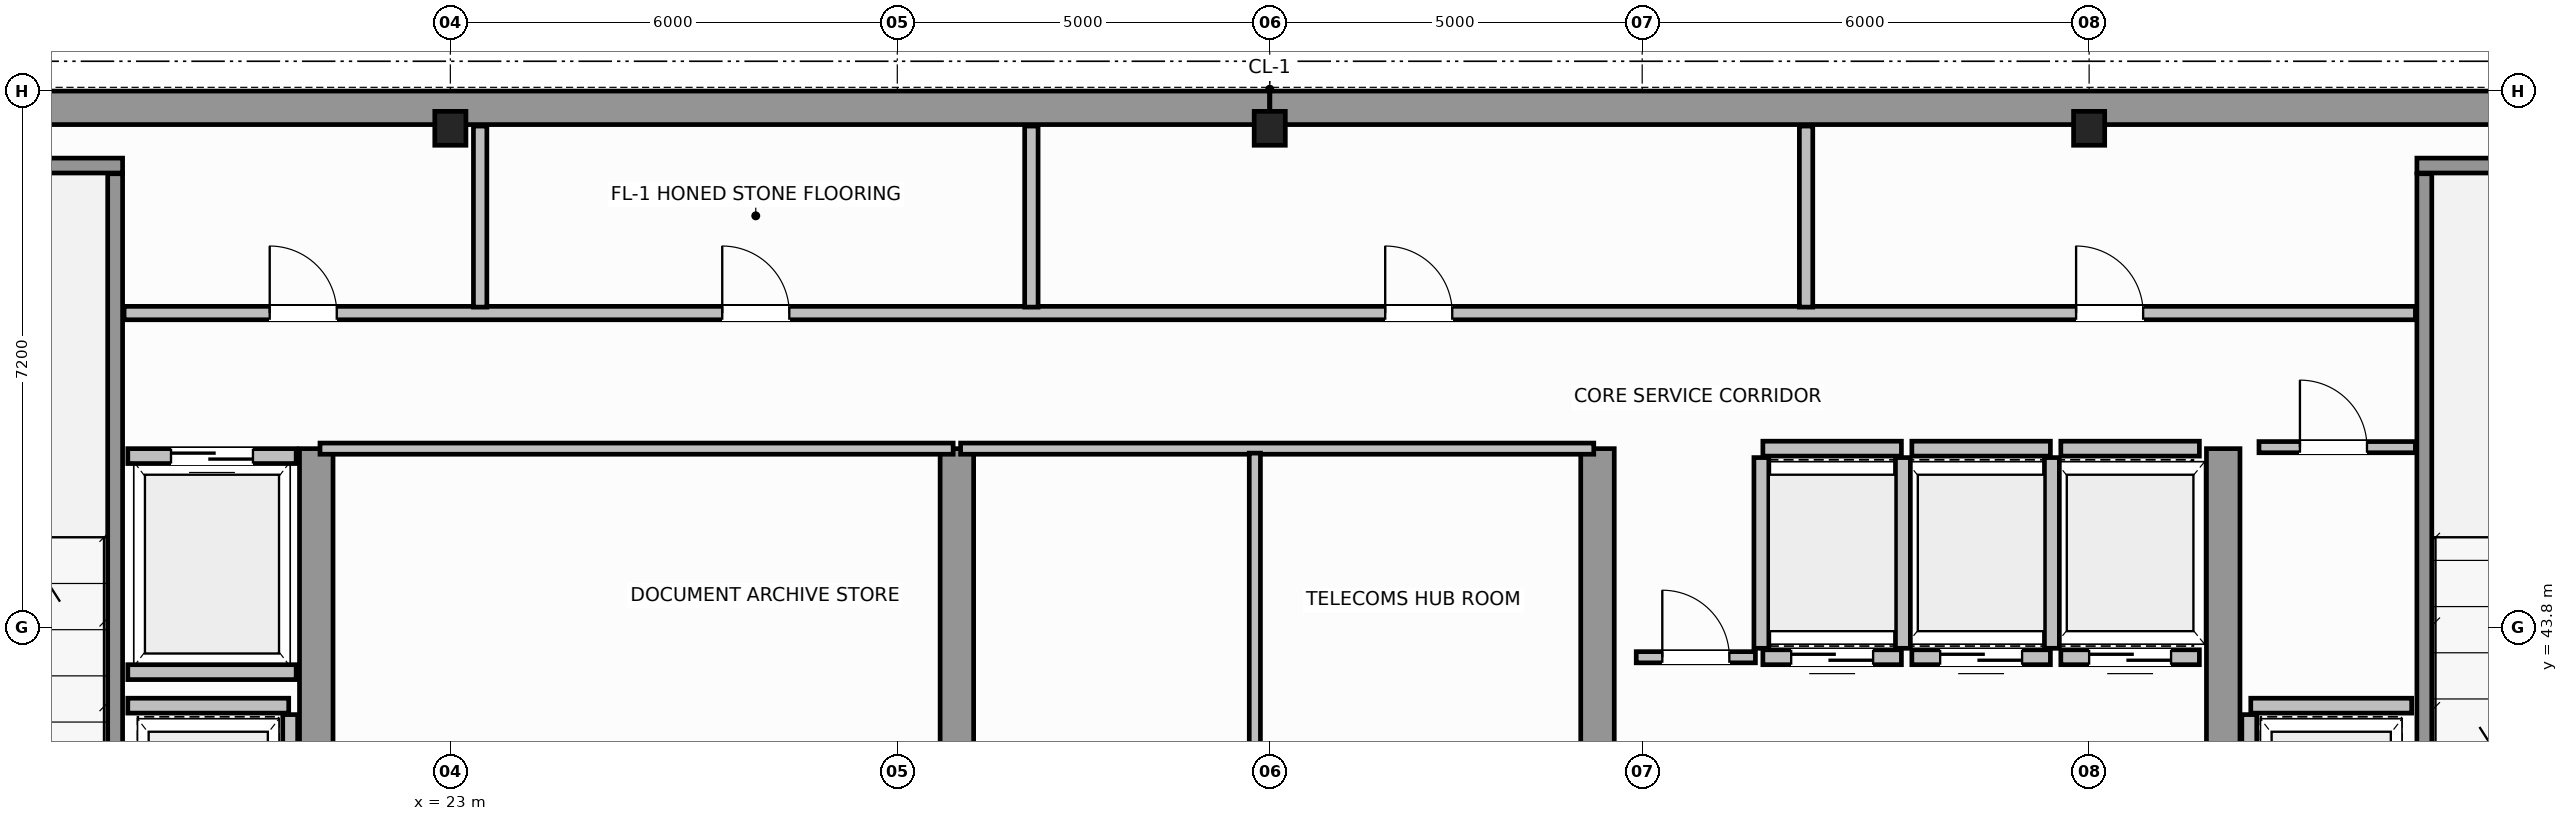
"""IFC4 building model, lengths in metres.
Left out: names, types, materials, properties, quantities, classifications, styles, units other than length and angle.
Written with IfcOpenShell. Run it as: python <this file> out.ifc"""

import sys

from ifc_helpers import new_model, si_unit, direction, frame, frame_2d, origin, origin_2d, place, context, subcontext, project, spatial, rectangle, i_section, extrude, source, transform, mapped, element, fill, save


model = new_model("IFC4")
c1 = context("Model", 3, precision=1e-05, world=origin(), true_north=direction((0.0, 1.0)))
c2 = subcontext(c1, "Body", "Model", "MODEL_VIEW")
j1 = project(units=[si_unit("LENGTHUNIT", "METRE"), si_unit("PLANEANGLEUNIT", "RADIAN")], contexts=[c1])
p1 = place(None, origin())
s1 = spatial("IfcSite", under=j1, at=p1, CompositionType="ELEMENT")
p2 = place(p1, origin())
s2 = spatial("IfcBuilding", under=s1, at=p2, CompositionType="ELEMENT")
p3 = place(p2, frame((0.0, 0.0, 253.6)))
s3 = spatial("IfcBuildingStorey", under=s2, at=p3, CompositionType="ELEMENT", Elevation=253.6)
m1 = source(origin(), c2, "Body", "SweptSolid", [
    extrude(i_section(OverallWidth=0.418, OverallDepth=0.455, WebThickness=0.042, FlangeThickness=0.058, FilletRadius=0.015, at=origin_2d()), origin(), (0.0, 0.0, 1.0), 3.8),
])
for number, where, z_axis, x_axis in (
    (1, (23.0, 50.5, 0.0), (0.0, 0.0, 1.0), (1.0, 0.0, 0.0)),
    (2, (34.0, 50.5, 0.0), (0.0, 0.0, 1.0), (1.0, 0.0, 0.0)),
    (3, (45.0, 50.5, 0.0), (0.0, 0.0, 1.0), (1.0, 0.0, 0.0)),
):
    element("IfcColumn", number, at=place(p3, frame(where, z_axis=z_axis, x_axis=x_axis)), inside=s3, PredefinedType="COLUMN", context=c2, shape_type="MappedRepresentation", body=[
        mapped(m1, transform((0.0, 0.0, 0.0), scale=1.0)),
    ])
for number, where, z_axis, x_axis in (
    (4, (14.229, 50.775, 0.0), (0.0, 0.0, 1.0), (1.0, 0.0, 0.0)),
    (5, (34.002, 50.775, 0.0), (0.0, 0.0, 1.0), (1.0, 0.0, 0.0)),
):
    element("IfcWall", number, at=place(p3, frame(where, z_axis=z_axis, x_axis=x_axis)), inside=s3, PredefinedType="SHEAR", context=c2, shape_type="SweptSolid", body=[
        extrude(rectangle(XDim=19.769, YDim=0.45, at=frame_2d((9.885, 0.0))), origin(), (0.0, 0.0, 1.0), 3.8),
    ])
for number, where, z_axis, x_axis in (
    (6, (21.2, 36.745, 0.0), (0.0, 0.0, 1.0), (0.0, 1.0, 0.0)),
    (7, (29.8, 36.745, 0.0), (0.0, 0.0, 1.0), (0.0, 1.0, 0.0)),
    (8, (38.4, 36.745, 0.0), (0.0, 0.0, 1.0), (0.0, 1.0, 0.0)),
    (9, (46.8, 36.745, 0.0), (0.0, 0.0, 1.0), (0.0, 1.0, 0.0)),
):
    element("IfcWall", number, at=place(p3, frame(where, z_axis=z_axis, x_axis=x_axis)), inside=s3, PredefinedType="SHEAR", context=c2, shape_type="SweptSolid", body=[
        extrude(rectangle(XDim=9.455, YDim=0.45, at=frame_2d((4.728, 0.0))), origin(), (0.0, 0.0, 1.0), 3.8),
    ])
p4 = place(p3, frame((14.225, 50.0, 0.0), z_axis=(0.0, 0.0, 1.0), x_axis=(1.0, 0.0, 0.0)))
e10 = element("IfcWall", 10, at=p4, inside=s3, PredefinedType="SOLIDWALL", context=c2, shape_type="SweptSolid", body=[
    extrude(rectangle(XDim=4.375, YDim=0.2, at=frame_2d((2.188, 0.0))), origin(), (0.0, 0.0, 1.0), 3.8),
])
p5 = place(p3, frame((18.5, 39.96, 0.0), z_axis=(0.0, 0.0, 1.0), x_axis=(0.0, 1.0, 0.0)))
e11 = element("IfcWall", 11, at=p5, inside=s3, PredefinedType="SOLIDWALL", context=c2, shape_type="SweptSolid", body=[
    extrude(rectangle(XDim=9.93, YDim=0.2, at=frame_2d((4.965, 0.0))), origin(), (0.0, 0.0, 1.0), 3.8),
])
p6 = place(p3, frame((49.4, 50.0, 0.0), z_axis=(0.0, 0.0, 1.0), x_axis=(1.0, 0.0, 0.0)))
e12 = element("IfcWall", 12, at=p6, inside=s3, PredefinedType="SOLIDWALL", context=c2, shape_type="SweptSolid", body=[
    extrude(rectangle(XDim=4.375, YDim=0.2, at=frame_2d((2.188, 0.0))), origin(), (0.0, 0.0, 1.0), 3.8),
])
p7 = place(p3, frame((49.5, 39.96, 0.0), z_axis=(0.0, 0.0, 1.0), x_axis=(0.0, 1.0, 0.0)))
e13 = element("IfcWall", 13, at=p7, inside=s3, PredefinedType="SOLIDWALL", context=c2, shape_type="SweptSolid", body=[
    extrude(rectangle(XDim=9.93, YDim=0.2, at=frame_2d((4.965, 0.0))), origin(), (0.0, 0.0, 1.0), 3.8),
])
p8 = place(p3, frame((40.62, 43.4, 0.0), z_axis=(0.0, 0.0, 1.0), x_axis=(1.0, 0.0, 0.0)))
e14 = element("IfcWall", 14, at=p8, inside=s3, PredefinedType="SOLIDWALL", context=c2, shape_type="SweptSolid", body=[
    extrude(rectangle(XDim=1.86, YDim=0.2, at=frame_2d((0.93, 0.0))), origin(), (0.0, 0.0, 1.0), 3.58),
])
p9 = place(p8, frame((0.38, 0.0, 0.0)))
e15 = element("IfcOpeningElement", 15, at=p9, cuts=e14, PredefinedType="OPENING", context=c2, shape_type="SweptSolid", body=[
    extrude(rectangle(XDim=1.1, YDim=2.15, at=frame_2d((0.55, 1.075))), frame((0.0, 0.11, 0.0), z_axis=(0.0, -1.0, 0.0), x_axis=(1.0, 0.0, 0.0)), (0.0, 0.0, 1.0), 0.22),
])
p10 = place(p3, frame((40.62, 46.2, 0.0), z_axis=(0.0, 0.0, 1.0), x_axis=(1.0, 0.0, 0.0)))
e16 = element("IfcWall", 16, at=p10, inside=s3, PredefinedType="SOLIDWALL", context=c2, shape_type="SweptSolid", body=[
    extrude(rectangle(XDim=1.86, YDim=0.2, at=frame_2d((0.93, 0.0))), origin(), (0.0, 0.0, 1.0), 3.58),
])
for number, where, z_axis, x_axis in (
    (17, (40.6, 43.52, 0.0), (0.0, 0.0, 1.0), (0.0, 1.0, 0.0)),
    (18, (42.5, 43.52, 0.0), (0.0, 0.0, 1.0), (0.0, 1.0, 0.0)),
):
    element("IfcWall", number, at=place(p3, frame(where, z_axis=z_axis, x_axis=x_axis)), inside=s3, PredefinedType="SOLIDWALL", context=c2, shape_type="SweptSolid", body=[
        extrude(rectangle(XDim=2.56, YDim=0.2, at=frame_2d((1.28, 0.0))), origin(), (0.0, 0.0, 1.0), 3.58),
    ])
p11 = place(p3, frame((42.62, 43.4, 0.0), z_axis=(0.0, 0.0, 1.0), x_axis=(1.0, 0.0, 0.0)))
e19 = element("IfcWall", 19, at=p11, inside=s3, PredefinedType="SOLIDWALL", context=c2, shape_type="SweptSolid", body=[
    extrude(rectangle(XDim=1.86, YDim=0.2, at=frame_2d((0.93, 0.0))), origin(), (0.0, 0.0, 1.0), 3.58),
])
p12 = place(p11, frame((0.38, 0.0, 0.0)))
e20 = element("IfcOpeningElement", 20, at=p12, cuts=e19, PredefinedType="OPENING", context=c2, shape_type="SweptSolid", body=[
    extrude(rectangle(XDim=1.1, YDim=2.15, at=frame_2d((0.55, 1.075))), frame((0.0, 0.11, 0.0), z_axis=(0.0, -1.0, 0.0), x_axis=(1.0, 0.0, 0.0)), (0.0, 0.0, 1.0), 0.22),
])
p13 = place(p3, frame((42.62, 46.2, 0.0), z_axis=(0.0, 0.0, 1.0), x_axis=(1.0, 0.0, 0.0)))
e21 = element("IfcWall", 21, at=p13, inside=s3, PredefinedType="SOLIDWALL", context=c2, shape_type="SweptSolid", body=[
    extrude(rectangle(XDim=1.86, YDim=0.2, at=frame_2d((0.93, 0.0))), origin(), (0.0, 0.0, 1.0), 3.58),
])
p14 = place(p3, frame((44.5, 43.52, 0.0), z_axis=(0.0, 0.0, 1.0), x_axis=(0.0, 1.0, 0.0)))
e22 = element("IfcWall", 22, at=p14, inside=s3, PredefinedType="SOLIDWALL", context=c2, shape_type="SweptSolid", body=[
    extrude(rectangle(XDim=2.56, YDim=0.2, at=frame_2d((1.28, 0.0))), origin(), (0.0, 0.0, 1.0), 3.58),
])
p15 = place(p3, frame((44.62, 43.4, 0.0), z_axis=(0.0, 0.0, 1.0), x_axis=(1.0, 0.0, 0.0)))
e23 = element("IfcWall", 23, at=p15, inside=s3, PredefinedType="SOLIDWALL", context=c2, shape_type="SweptSolid", body=[
    extrude(rectangle(XDim=1.86, YDim=0.2, at=frame_2d((0.93, 0.0))), origin(), (0.0, 0.0, 1.0), 3.58),
])
p16 = place(p15, frame((0.38, 0.0, 0.0)))
e24 = element("IfcOpeningElement", 24, at=p16, cuts=e23, PredefinedType="OPENING", context=c2, shape_type="SweptSolid", body=[
    extrude(rectangle(XDim=1.1, YDim=2.15, at=frame_2d((0.55, 1.075))), frame((0.0, 0.11, 0.0), z_axis=(0.0, -1.0, 0.0), x_axis=(1.0, 0.0, 0.0)), (0.0, 0.0, 1.0), 0.22),
])
p17 = place(p3, frame((44.62, 46.2, 0.0), z_axis=(0.0, 0.0, 1.0), x_axis=(1.0, 0.0, 0.0)))
e25 = element("IfcWall", 25, at=p17, inside=s3, PredefinedType="SOLIDWALL", context=c2, shape_type="SweptSolid", body=[
    extrude(rectangle(XDim=1.86, YDim=0.2, at=frame_2d((0.93, 0.0))), origin(), (0.0, 0.0, 1.0), 3.58),
])
p18 = place(p3, frame((18.67, 46.1, 0.0), z_axis=(0.0, 0.0, 1.0), x_axis=(1.0, 0.0, 0.0)))
e26 = element("IfcWall", 26, at=p18, inside=s3, PredefinedType="SOLIDWALL", context=c2, shape_type="SweptSolid", body=[
    extrude(rectangle(XDim=2.26, YDim=0.2, at=frame_2d((1.13, 0.0))), origin(), (0.0, 0.0, 1.0), 3.58),
])
p19 = place(p18, frame((0.58, 0.0, 0.0)))
e27 = element("IfcOpeningElement", 27, at=p19, cuts=e26, PredefinedType="OPENING", context=c2, shape_type="SweptSolid", body=[
    extrude(rectangle(XDim=1.1, YDim=2.15, at=frame_2d((0.55, 1.075))), frame((0.0, 0.11, 0.0), z_axis=(0.0, -1.0, 0.0), x_axis=(1.0, 0.0, 0.0)), (0.0, 0.0, 1.0), 0.22),
])
p20 = place(p3, frame((18.67, 43.2, 0.0), z_axis=(0.0, 0.0, 1.0), x_axis=(1.0, 0.0, 0.0)))
e28 = element("IfcWall", 28, at=p20, inside=s3, PredefinedType="SOLIDWALL", context=c2, shape_type="SweptSolid", body=[
    extrude(rectangle(XDim=2.26, YDim=0.2, at=frame_2d((1.13, 0.0))), origin(), (0.0, 0.0, 1.0), 3.58),
])
p21 = place(p3, frame((18.67, 42.75, 0.0), z_axis=(0.0, 0.0, 1.0), x_axis=(1.0, 0.0, 0.0)))
e29 = element("IfcWall", 29, at=p21, inside=s3, PredefinedType="SOLIDWALL", context=c2, shape_type="SweptSolid", body=[
    extrude(rectangle(XDim=2.16, YDim=0.2, at=frame_2d((1.08, 0.0))), origin(), (0.0, 0.0, 1.0), 3.58),
])
p22 = place(p3, frame((20.85, 40.07, 0.0), z_axis=(0.0, 0.0, 1.0), x_axis=(0.0, 1.0, 0.0)))
e30 = element("IfcWall", 30, at=p22, inside=s3, PredefinedType="SOLIDWALL", context=c2, shape_type="SweptSolid", body=[
    extrude(rectangle(XDim=2.56, YDim=0.2, at=frame_2d((1.28, 0.0))), origin(), (0.0, 0.0, 1.0), 3.58),
])
p23 = place(p3, frame((47.17, 42.75, 0.0), z_axis=(0.0, 0.0, 1.0), x_axis=(1.0, 0.0, 0.0)))
e31 = element("IfcWall", 31, at=p23, inside=s3, PredefinedType="SOLIDWALL", context=c2, shape_type="SweptSolid", body=[
    extrude(rectangle(XDim=2.16, YDim=0.2, at=frame_2d((1.08, 0.0))), origin(), (0.0, 0.0, 1.0), 3.58),
])
p24 = place(p3, frame((47.15, 40.07, 0.0), z_axis=(0.0, 0.0, 1.0), x_axis=(0.0, 1.0, 0.0)))
e32 = element("IfcWall", 32, at=p24, inside=s3, PredefinedType="SOLIDWALL", context=c2, shape_type="SweptSolid", body=[
    extrude(rectangle(XDim=2.56, YDim=0.2, at=frame_2d((1.28, 0.0))), origin(), (0.0, 0.0, 1.0), 3.58),
])
for number, where, z_axis, x_axis in (
    (33, (21.25, 46.2, 0.0), (0.0, 0.0, 1.0), (1.0, 0.0, 0.0)),
    (34, (29.85, 46.2, 0.0), (0.0, 0.0, 1.0), (1.0, 0.0, 0.0)),
):
    element("IfcWall", number, at=place(p3, frame(where, z_axis=z_axis, x_axis=x_axis)), inside=s3, PredefinedType="PARTITIONING", context=c2, shape_type="SweptSolid", body=[
        extrude(rectangle(XDim=8.5, YDim=0.15, at=frame_2d((4.25, 0.0))), origin(), (0.0, 0.0, 1.0), 3.58),
    ])
p25 = place(p3, frame((33.8, 36.56, 0.0), z_axis=(0.0, 0.0, 1.0), x_axis=(0.0, 1.0, 0.0)))
e35 = element("IfcWall", 35, at=p25, inside=s3, PredefinedType="PARTITIONING", context=c2, shape_type="SweptSolid", body=[
    extrude(rectangle(XDim=9.58, YDim=0.15, at=frame_2d((4.79, 0.0))), origin(), (0.0, 0.0, 1.0), 3.58),
])
p26 = place(p25, frame((4.2, 0.0, 0.0)))
e36 = element("IfcOpeningElement", 36, at=p26, cuts=e35, PredefinedType="OPENING", context=c2, shape_type="SweptSolid", body=[
    extrude(rectangle(XDim=0.9, YDim=2.1, at=frame_2d((0.45, 1.05))), frame((0.0, 0.085, 0.0), z_axis=(0.0, -1.0, 0.0), x_axis=(1.0, 0.0, 0.0)), (0.0, 0.0, 1.0), 0.17),
])
p27 = place(p3, frame((47.28, 46.22, 0.0), z_axis=(0.0, 0.0, 1.0), x_axis=(1.0, 0.0, 0.0)))
e37 = element("IfcWall", 37, at=p27, inside=s3, PredefinedType="PARTITIONING", context=c2, shape_type="SweptSolid", body=[
    extrude(rectangle(XDim=2.1, YDim=0.15, at=frame_2d((1.05, 0.0))), origin(), (0.0, 0.0, 1.0), 3.58),
])
p28 = place(p27, frame((0.55, 0.0, 0.0)))
e38 = element("IfcOpeningElement", 38, at=p28, cuts=e37, PredefinedType="OPENING", context=c2, shape_type="SweptSolid", body=[
    extrude(rectangle(XDim=0.9, YDim=2.1, at=frame_2d((0.45, 1.05))), frame((0.0, 0.085, 0.0), z_axis=(0.0, -1.0, 0.0), x_axis=(1.0, 0.0, 0.0)), (0.0, 0.0, 1.0), 0.17),
])
p29 = place(p3, frame((38.92, 43.4, 0.0), z_axis=(0.0, 0.0, 1.0), x_axis=(1.0, 0.0, 0.0)))
e39 = element("IfcWall", 39, at=p29, inside=s3, PredefinedType="PARTITIONING", context=c2, shape_type="SweptSolid", body=[
    extrude(rectangle(XDim=1.6, YDim=0.15, at=frame_2d((0.8, 0.0))), origin(), (0.0, 0.0, 1.0), 3.58),
])
p30 = place(p29, frame((0.35, 0.0, 0.0)))
e40 = element("IfcOpeningElement", 40, at=p30, cuts=e39, PredefinedType="OPENING", context=c2, shape_type="SweptSolid", body=[
    extrude(rectangle(XDim=0.9, YDim=2.1, at=frame_2d((0.45, 1.05))), frame((0.0, 0.085, 0.0), z_axis=(0.0, -1.0, 0.0), x_axis=(1.0, 0.0, 0.0)), (0.0, 0.0, 1.0), 0.17),
])
p31 = place(p3, frame((18.62, 48.02, 0.0), z_axis=(0.0, 0.0, 1.0), x_axis=(1.0, 0.0, 0.0)))
e41 = element("IfcWall", 41, at=p31, inside=s3, PredefinedType="PLUMBINGWALL", context=c2, shape_type="SweptSolid", body=[
    extrude(rectangle(XDim=30.76, YDim=0.18, at=frame_2d((15.38, 0.0))), origin(), (0.0, 0.0, 1.0), 3.58),
])
p32 = place(p31, frame((1.955, 0.0, 0.0)))
e42 = element("IfcOpeningElement", 42, at=p32, cuts=e41, PredefinedType="OPENING", context=c2, shape_type="SweptSolid", body=[
    extrude(rectangle(XDim=0.9, YDim=2.15, at=frame_2d((0.45, 1.075))), frame((0.0, 0.1, 0.0), z_axis=(0.0, -1.0, 0.0), x_axis=(1.0, 0.0, 0.0)), (0.0, 0.0, 1.0), 0.2),
])
p33 = place(p31, frame((8.03, 0.0, 0.0)))
e43 = element("IfcOpeningElement", 43, at=p33, cuts=e41, PredefinedType="OPENING", context=c2, shape_type="SweptSolid", body=[
    extrude(rectangle(XDim=0.9, YDim=2.15, at=frame_2d((0.45, 1.075))), frame((0.0, 0.1, 0.0), z_axis=(0.0, -1.0, 0.0), x_axis=(1.0, 0.0, 0.0)), (0.0, 0.0, 1.0), 0.2),
])
p34 = place(p31, frame((16.93, 0.0, 0.0)))
e44 = element("IfcOpeningElement", 44, at=p34, cuts=e41, PredefinedType="OPENING", context=c2, shape_type="SweptSolid", body=[
    extrude(rectangle(XDim=0.9, YDim=2.15, at=frame_2d((0.45, 1.075))), frame((0.0, 0.1, 0.0), z_axis=(0.0, -1.0, 0.0), x_axis=(1.0, 0.0, 0.0)), (0.0, 0.0, 1.0), 0.2),
])
p35 = place(p31, frame((26.205, 0.0, 0.0)))
e45 = element("IfcOpeningElement", 45, at=p35, cuts=e41, PredefinedType="OPENING", context=c2, shape_type="SweptSolid", body=[
    extrude(rectangle(XDim=0.9, YDim=2.15, at=frame_2d((0.45, 1.075))), frame((0.0, 0.1, 0.0), z_axis=(0.0, -1.0, 0.0), x_axis=(1.0, 0.0, 0.0)), (0.0, 0.0, 1.0), 0.2),
])
for number, where, z_axis, x_axis in (
    (46, (23.4, 48.1, 0.0), (0.0, 0.0, 1.0), (0.0, 1.0, 0.0)),
    (47, (30.8, 48.1, 0.0), (0.0, 0.0, 1.0), (0.0, 1.0, 0.0)),
    (48, (41.2, 48.1, 0.0), (0.0, 0.0, 1.0), (0.0, 1.0, 0.0)),
):
    element("IfcWall", number, at=place(p3, frame(where, z_axis=z_axis, x_axis=x_axis)), inside=s3, PredefinedType="PLUMBINGWALL", context=c2, shape_type="SweptSolid", body=[
        extrude(rectangle(XDim=2.43, YDim=0.18, at=frame_2d((1.215, 0.0))), origin(), (0.0, 0.0, 1.0), 3.58),
    ])
m2 = source(origin(), c2, "Body", "SweptSolid", [
    extrude(rectangle(XDim=1.1, YDim=2.15, at=frame_2d((0.55, 1.075))), frame((0.0, 0.025, 0.0), z_axis=(0.0, -1.0, 0.0), x_axis=(1.0, 0.0, 0.0)), (0.0, 0.0, 1.0), 0.05),
])
p36 = place(p9, origin())
e49 = element("IfcDoor", 49, at=p36, inside=s3, OperationType="DOUBLE_DOOR_SLIDING", PredefinedType="DOOR", context=c2, shape_type="MappedRepresentation", body=[
    mapped(m2, transform((0.0, 0.0, 0.0), scale=1.0)),
])
fill(e15, e49)
p37 = place(p12, origin())
e50 = element("IfcDoor", 50, at=p37, inside=s3, OperationType="DOUBLE_DOOR_SLIDING", PredefinedType="DOOR", context=c2, shape_type="MappedRepresentation", body=[
    mapped(m2, transform((0.0, 0.0, 0.0), scale=1.0)),
])
fill(e20, e50)
p38 = place(p16, origin())
e51 = element("IfcDoor", 51, at=p38, inside=s3, OperationType="DOUBLE_DOOR_SLIDING", PredefinedType="DOOR", context=c2, shape_type="MappedRepresentation", body=[
    mapped(m2, transform((0.0, 0.0, 0.0), scale=1.0)),
])
fill(e24, e51)
p39 = place(p19, origin())
e52 = element("IfcDoor", 52, at=p39, inside=s3, OperationType="DOUBLE_DOOR_SLIDING", PredefinedType="DOOR", context=c2, shape_type="MappedRepresentation", body=[
    mapped(m2, transform((0.0, 0.0, 0.0), scale=1.0)),
])
fill(e27, e52)
m3 = source(origin(), c2, "Body", "SweptSolid", [
    extrude(rectangle(XDim=0.9, YDim=2.1, at=frame_2d((0.45, 1.05))), frame((0.0, 0.025, 0.0), z_axis=(0.0, -1.0, 0.0), x_axis=(1.0, 0.0, 0.0)), (0.0, 0.0, 1.0), 0.05),
])
p40 = place(p28, origin())
e53 = element("IfcDoor", 53, at=p40, inside=s3, OperationType="SINGLE_SWING_RIGHT", PredefinedType="DOOR", context=c2, shape_type="MappedRepresentation", body=[
    mapped(m3, transform((0.0, 0.0, 0.0), scale=1.0)),
])
fill(e38, e53)
p41 = place(p30, origin())
e54 = element("IfcDoor", 54, at=p41, inside=s3, OperationType="SINGLE_SWING_LEFT", PredefinedType="DOOR", context=c2, shape_type="MappedRepresentation", body=[
    mapped(m3, transform((0.0, 0.0, 0.0), scale=1.0)),
])
fill(e40, e54)
m4 = source(origin(), c2, "Body", "SweptSolid", [
    extrude(rectangle(XDim=0.9, YDim=2.15, at=frame_2d((0.45, 1.075))), frame((0.0, 0.025, 0.0), z_axis=(0.0, -1.0, 0.0), x_axis=(1.0, 0.0, 0.0)), (0.0, 0.0, 1.0), 0.05),
])
p42 = place(p32, origin())
e55 = element("IfcDoor", 55, at=p42, inside=s3, OperationType="SINGLE_SWING_LEFT", PredefinedType="DOOR", context=c2, shape_type="MappedRepresentation", body=[
    mapped(m4, transform((0.0, 0.0, 0.0), scale=1.0)),
])
fill(e42, e55)
p43 = place(p33, origin())
e56 = element("IfcDoor", 56, at=p43, inside=s3, OperationType="SINGLE_SWING_RIGHT", PredefinedType="DOOR", context=c2, shape_type="MappedRepresentation", body=[
    mapped(m4, transform((0.0, 0.0, 0.0), scale=1.0)),
])
fill(e43, e56)
p44 = place(p34, origin())
e57 = element("IfcDoor", 57, at=p44, inside=s3, OperationType="SINGLE_SWING_LEFT", PredefinedType="DOOR", context=c2, shape_type="MappedRepresentation", body=[
    mapped(m4, transform((0.0, 0.0, 0.0), scale=1.0)),
])
fill(e44, e57)
p45 = place(p35, origin())
e58 = element("IfcDoor", 58, at=p45, inside=s3, OperationType="SINGLE_SWING_RIGHT", PredefinedType="DOOR", context=c2, shape_type="MappedRepresentation", body=[
    mapped(m4, transform((0.0, 0.0, 0.0), scale=1.0)),
])
fill(e45, e58)
save(model, sys.argv[1])
